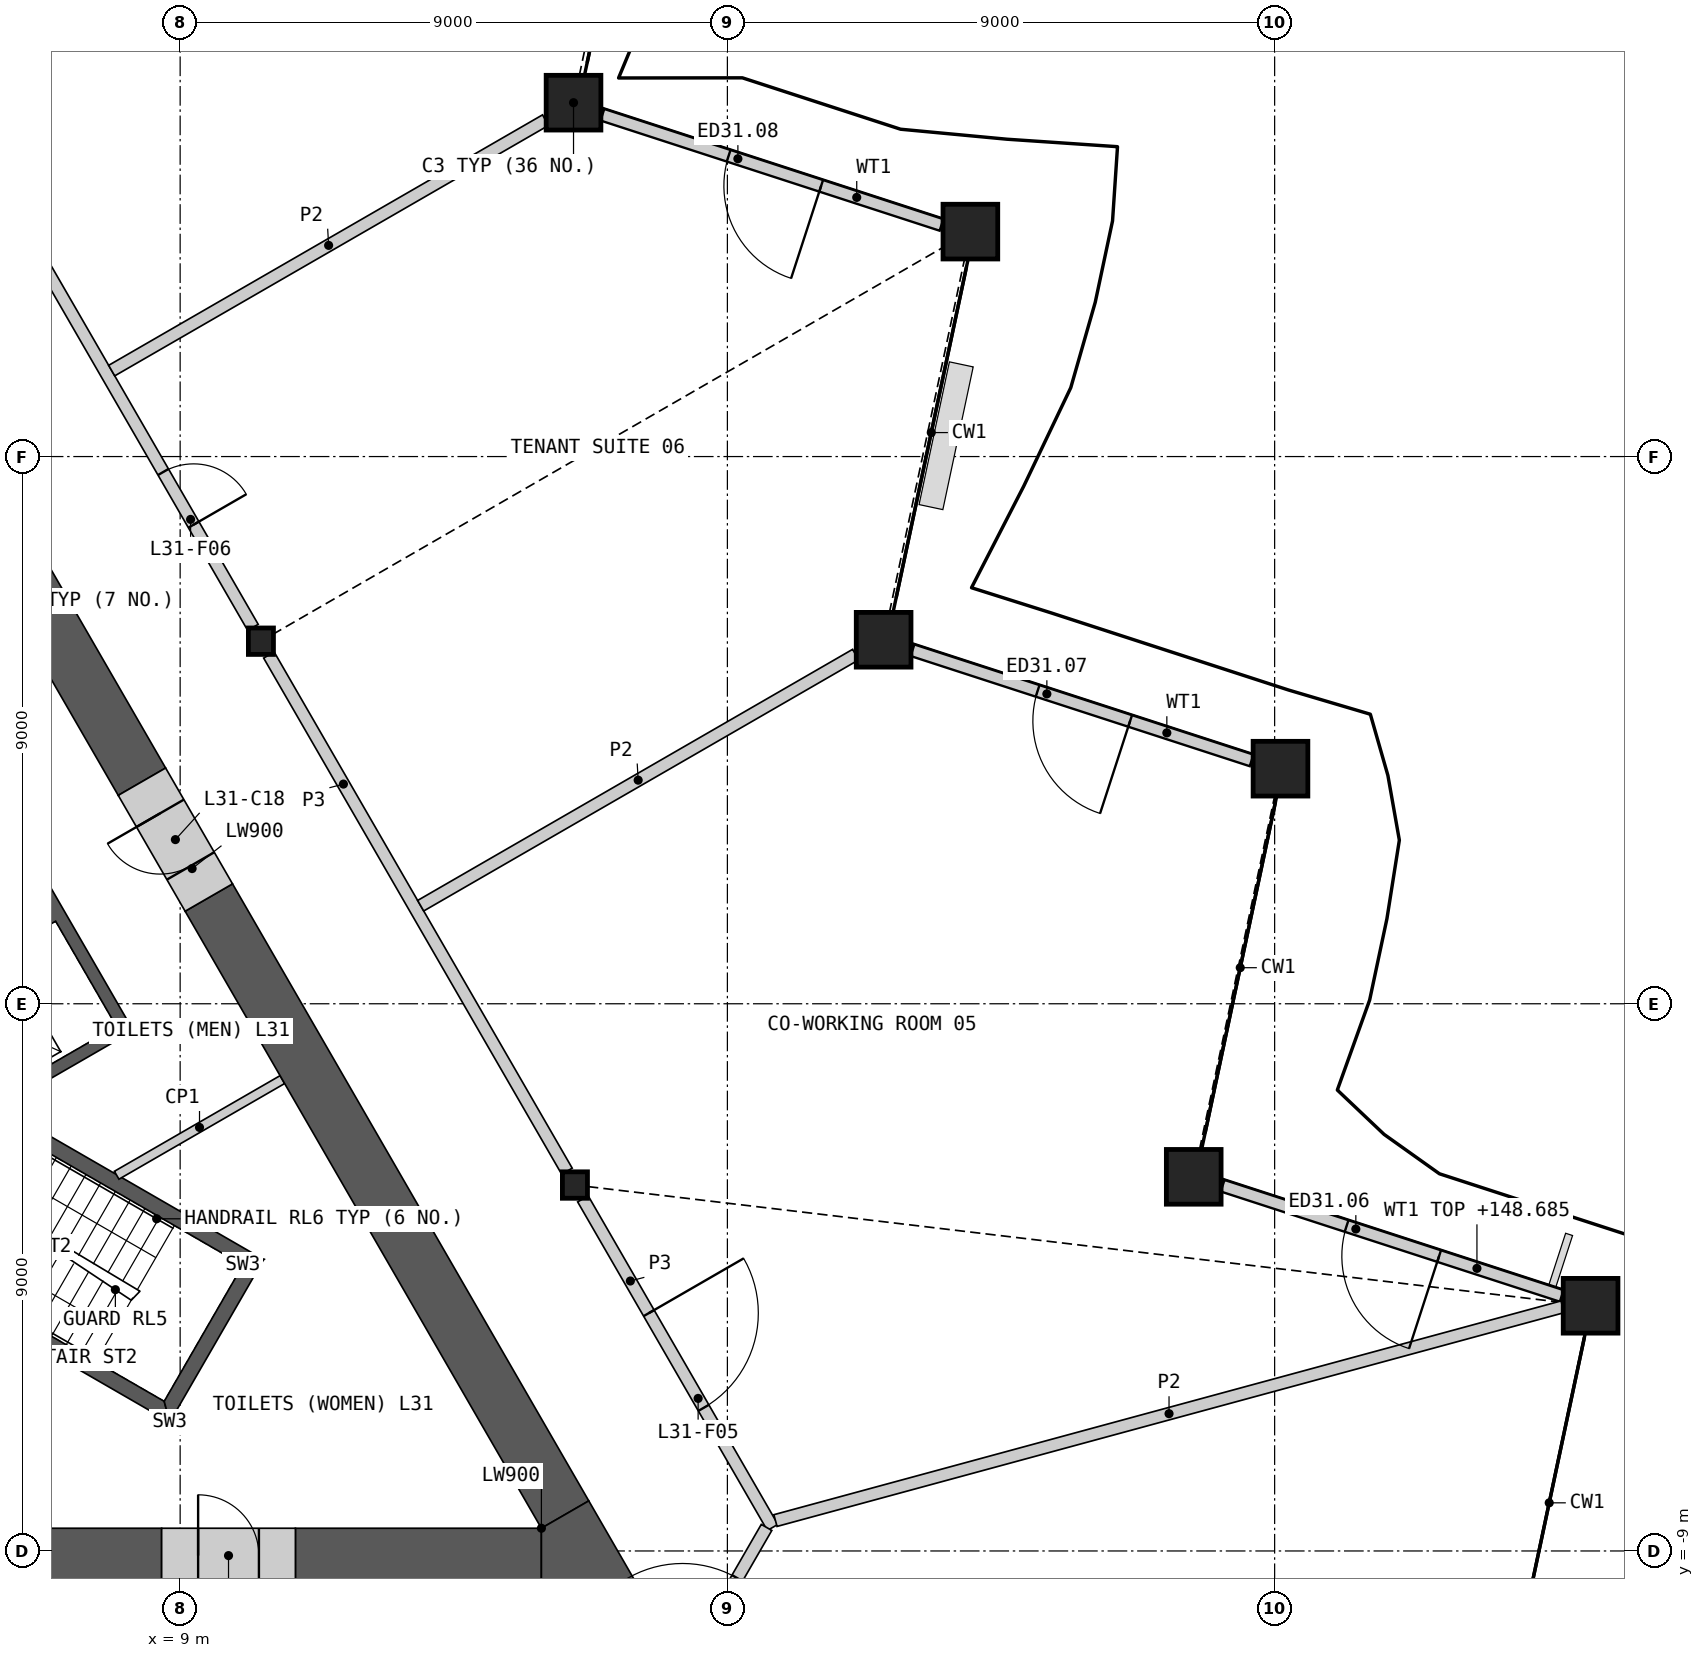
"""IFC4 building model, lengths in metres.
Left out: names, types, materials, properties, quantities, classifications, styles, units other than length and angle.
Written with IfcOpenShell. Run it as: python <this file> out.ifc"""

import sys

from ifc_helpers import new_model, si_unit, direction, frame, frame_2d, origin, origin_2d, place, context, subcontext, project, spatial, polyline, rectangle, hollow_rectangle, i_section, outline, extrude, element, fill, save


model = new_model("IFC4")
c1 = context("Model", 3, precision=1e-05, world=origin(), true_north=direction((0.0, 1.0)))
c2 = subcontext(c1, "Body", "Model", "MODEL_VIEW")
j1 = project(units=[si_unit("LENGTHUNIT", "METRE"), si_unit("PLANEANGLEUNIT", "RADIAN")], contexts=[c1])
p1 = place(None, origin())
s1 = spatial("IfcSite", under=j1, at=p1, CompositionType="ELEMENT")
p2 = place(p1, origin())
s2 = spatial("IfcBuilding", under=s1, at=p2, CompositionType="ELEMENT")
p3 = place(p2, frame((0.0, 0.0, 145.8)))
s3 = spatial("IfcBuildingStorey", under=s2, at=p3, CompositionType="ELEMENT", Elevation=145.8)
for number, where, z_axis, x_axis in (
    (1, (32.196, -4.967, 0.0), (0.0, 0.0, 1.0), (1.0, 0.0, 0.0)),
    (2, (25.669, -2.846, 0.0), (0.0, 0.0, 1.0), (1.0, 0.0, 0.0)),
    (3, (27.096, 3.866, 0.0), (0.0, 0.0, 1.0), (1.0, 0.0, 0.0)),
    (4, (20.57, 5.987, 0.0), (0.0, 0.0, 1.0), (1.0, 0.0, 0.0)),
    (5, (21.996, 12.699, 0.0), (0.0, 0.0, 1.0), (1.0, 0.0, 0.0)),
    (6, (15.469, 14.82, 0.0), (0.0, 0.0, 1.0), (1.0, 0.0, 0.0)),
):
    element("IfcColumn", number, at=place(p3, frame(where, z_axis=z_axis, x_axis=x_axis)), inside=s3, PredefinedType="COLUMN", context=c2, shape_type="SweptSolid", body=[
        extrude(hollow_rectangle(XDim=0.9, YDim=0.9, WallThickness=0.06, at=origin_2d()), origin(), (0.0, 0.0, 1.0), 4.2),
    ])
for number, where, z_axis, x_axis in (
    (7, (15.493, -2.982, 0.0), (0.0, 0.0, 1.0), (1.0, 0.0, 0.0)),
    (8, (10.328, 5.963, 0.0), (0.0, 0.0, 1.0), (1.0, 0.0, 0.0)),
):
    element("IfcColumn", number, at=place(p3, frame(where, z_axis=z_axis, x_axis=x_axis)), inside=s3, PredefinedType="COLUMN", context=c2, shape_type="SweptSolid", body=[
        extrude(i_section(OverallWidth=0.412, OverallDepth=0.435, WebThickness=0.036, FlangeThickness=0.057, at=origin_2d()), origin(), (0.0, 0.0, 1.0), 4.2),
    ])
p4 = place(p3, frame((31.721, -4.805, 0.0), z_axis=(0.0, 0.0, 1.0), x_axis=(-0.951053952554, 0.309024884649, 0.0)))
e9 = element("IfcWall", 9, at=p4, inside=s3, PredefinedType="SOLIDWALL", context=c2, shape_type="SweptSolid", body=[
    extrude(rectangle(XDim=5.865, YDim=0.2, at=frame_2d((2.932, 0.0))), origin(), (0.0, 0.0, 1.0), 2.885),
])
p5 = place(p4, frame((2.12, 0.0, 0.0)))
e10 = element("IfcOpeningElement", 10, at=p5, cuts=e9, PredefinedType="OPENING", context=c2, shape_type="SweptSolid", body=[
    extrude(rectangle(XDim=1.6, YDim=2.4, at=frame_2d((0.8, 1.2))), frame((0.0, 0.11, 0.0), z_axis=(0.0, -1.0, 0.0), x_axis=(1.0, 0.0, 0.0)), (0.0, 0.0, 1.0), 0.22),
])
p6 = place(p3, frame((26.622, 4.002, 0.0), z_axis=(0.0, 0.0, 1.0), x_axis=(-0.951053952554, 0.309024884649, 0.0)))
e11 = element("IfcWall", 11, at=p6, inside=s3, PredefinedType="SOLIDWALL", context=c2, shape_type="SweptSolid", body=[
    extrude(rectangle(XDim=5.865, YDim=0.2, at=frame_2d((2.932, 0.0))), origin(), (0.0, 0.0, 1.0), 3.189),
])
p7 = place(p6, frame((2.101, 0.0, 0.0)))
e12 = element("IfcOpeningElement", 12, at=p7, cuts=e11, PredefinedType="OPENING", context=c2, shape_type="SweptSolid", body=[
    extrude(rectangle(XDim=1.6, YDim=2.4, at=frame_2d((0.8, 1.2))), frame((0.0, 0.11, 0.0), z_axis=(0.0, -1.0, 0.0), x_axis=(1.0, 0.0, 0.0)), (0.0, 0.0, 1.0), 0.22),
])
p8 = place(p3, frame((21.521, 12.81, 0.0), z_axis=(0.0, 0.0, 1.0), x_axis=(-0.951049976734, 0.309037120351, 0.0)))
e13 = element("IfcWall", 13, at=p8, inside=s3, PredefinedType="SOLIDWALL", context=c2, shape_type="SweptSolid", body=[
    extrude(rectangle(XDim=5.864, YDim=0.2, at=frame_2d((2.932, 0.0))), origin(), (0.0, 0.0, 1.0), 3.189),
])
p9 = place(p8, frame((2.081, 0.0, 0.0)))
e14 = element("IfcOpeningElement", 14, at=p9, cuts=e13, PredefinedType="OPENING", context=c2, shape_type="SweptSolid", body=[
    extrude(rectangle(XDim=1.6, YDim=2.4, at=frame_2d((0.8, 1.2))), frame((0.0, 0.11, 0.0), z_axis=(0.0, -1.0, 0.0), x_axis=(1.0, 0.0, 0.0)), (0.0, 0.0, 1.0), 0.22),
])
p10 = place(p3, origin())
e15 = element("IfcWall", 15, at=p10, inside=s3, PredefinedType="SHEAR", context=c2, shape_type="SweptSolid", body=[
    extrude(outline(polyline([(2.66, 4.192), (4.831, 5.445), (8.231, -0.444), (6.061, -1.697), (5.96, -1.524), (7.952, -0.374), (6.952, 1.358), (4.96, 0.208), (4.861, 0.381), (6.852, 1.531), (5.852, 3.263), (3.861, 2.113), (3.76, 2.287), (5.752, 3.437), (4.752, 5.169), (2.76, 4.019), (2.66, 4.192)])), origin(), (0.0, 0.0, 1.0), 3.8),
])
p11 = place(p3, origin())
e16 = element("IfcWall", 16, at=p11, inside=s3, PredefinedType="SHEAR", context=c2, shape_type="SweptSolid", body=[
    extrude(outline(polyline([(3.763, -3.956), (8.83, -6.881), (8.738, -6.539), (3.888, -3.739), (3.763, -3.956)])), origin(), (0.0, 0.0, 1.0), 3.8),
])
p12 = place(p3, origin())
e17 = element("IfcWall", 17, at=p12, inside=s3, PredefinedType="SHEAR", context=c2, shape_type="SweptSolid", body=[
    extrude(outline(polyline([(8.83, -6.881), (10.374, -4.206), (10.032, -4.298), (8.738, -6.539), (8.83, -6.881)])), origin(), (0.0, 0.0, 1.0), 3.8),
])
p13 = place(p3, origin())
e18 = element("IfcWall", 18, at=p13, inside=s3, PredefinedType="SHEAR", context=c2, shape_type="SweptSolid", body=[
    extrude(outline(polyline([(10.032, -4.298), (10.374, -4.206), (5.307, -1.281), (5.182, -1.498), (10.032, -4.298)])), origin(), (0.0, 0.0, 1.0), 3.8),
])
p14 = place(p3, frame((10.681, -1.247, 0.0), z_axis=(0.0, 0.0, 1.0), x_axis=(-0.866018897435, -0.500011269158, 0.0)))
e19 = element("IfcWall", 19, at=p14, inside=s3, PredefinedType="PARTITIONING", context=c2, shape_type="SweptSolid", body=[
    extrude(rectangle(XDim=3.146, YDim=0.15, at=frame_2d((1.573, 0.0))), origin(), (0.0, 0.0, 1.0), 3.8),
])
p15 = place(p3, frame((1.1, -9.076, 0.0), z_axis=(0.0, 0.0, 1.0), x_axis=(1.0, 0.0, 0.0)))
e20 = element("IfcWall", 20, at=p15, inside=s3, PredefinedType="SHEAR", context=c2, shape_type="SweptSolid", body=[
    extrude(rectangle(XDim=7.595, YDim=0.9, at=frame_2d((3.798, 0.0))), origin(), (0.0, 0.0, 1.0), 3.8),
])
p16 = place(p3, frame((10.896, -9.076, 0.0), z_axis=(0.0, 0.0, 1.0), x_axis=(1.0, 0.0, 0.0)))
e21 = element("IfcWall", 21, at=p16, inside=s3, PredefinedType="SHEAR", context=c2, shape_type="SweptSolid", body=[
    extrude(rectangle(XDim=4.046, YDim=0.9, at=frame_2d((2.023, 0.0))), origin(), (0.0, 0.0, 1.0), 3.8),
])
p17 = place(p3, frame((8.372, 3.652, 0.0), z_axis=(0.0, 0.0, 1.0), x_axis=(-0.499997808738, 0.866026668906, 0.0)))
e22 = element("IfcWall", 22, at=p17, inside=s3, PredefinedType="SHEAR", context=c2, shape_type="SweptSolid", body=[
    extrude(rectangle(XDim=15.964, YDim=0.9, at=frame_2d((7.982, 0.0))), origin(), (0.0, 0.0, 1.0), 3.8),
])
p18 = place(p3, frame((15.331, -8.401, 0.0), z_axis=(0.0, 0.0, 1.0), x_axis=(-0.499995375004, 0.86602807401, 0.0)))
e23 = element("IfcWall", 23, at=p18, inside=s3, PredefinedType="SHEAR", context=c2, shape_type="SweptSolid", body=[
    extrude(rectangle(XDim=11.718, YDim=0.9, at=frame_2d((5.859, 0.0))), origin(), (0.0, 0.0, 1.0), 3.8),
])
p19 = place(p3, origin())
e24 = element("IfcWall", 24, at=p19, inside=s3, PredefinedType="SHEAR", context=c2, shape_type="SweptSolid", body=[
    extrude(outline(polyline([(14.941, -8.626), (15.721, -8.176), (16.5, -9.526), (14.941, -9.526), (14.941, -8.626)])), origin(), (0.0, 0.0, 1.0), 3.8),
])
p20 = place(p3, frame((8.696, -9.076, 0.0), z_axis=(0.0, 0.0, 1.0), x_axis=(1.0, 0.0, 0.0)))
e25 = element("IfcWall", 25, at=p20, inside=s3, PredefinedType="SHEAR", context=c2, shape_type="SweptSolid", body=[
    extrude(rectangle(XDim=2.2, YDim=0.9, at=frame_2d((1.1, 0.0))), origin(), (0.0, 0.0, 1.0), 3.8),
])
p21 = place(p20, frame((0.6, 0.0, 0.0)))
e26 = element("IfcOpeningElement", 26, at=p21, cuts=e25, PredefinedType="OPENING", context=c2, shape_type="SweptSolid", body=[
    extrude(rectangle(XDim=1.0, YDim=2.1, at=frame_2d((0.5, 1.05))), frame((0.0, 0.46, 0.0), z_axis=(0.0, -1.0, 0.0), x_axis=(1.0, 0.0, 0.0)), (0.0, 0.0, 1.0), 0.92),
])
p22 = place(p3, frame((9.472, 1.747, 0.0), z_axis=(0.0, 0.0, 1.0), x_axis=(-0.50002983664, 0.866008176907, 0.0)))
e27 = element("IfcWall", 27, at=p22, inside=s3, PredefinedType="SHEAR", context=c2, shape_type="SweptSolid", body=[
    extrude(rectangle(XDim=2.2, YDim=0.9, at=frame_2d((1.1, 0.0))), origin(), (0.0, 0.0, 1.0), 3.8),
])
p23 = place(p22, frame((0.6, 0.0, 0.0)))
e28 = element("IfcOpeningElement", 28, at=p23, cuts=e27, PredefinedType="OPENING", context=c2, shape_type="SweptSolid", body=[
    extrude(rectangle(XDim=1.0, YDim=2.1, at=frame_2d((0.5, 1.05))), frame((0.0, 0.46, 0.0), z_axis=(0.0, -1.0, 0.0), x_axis=(1.0, 0.0, 0.0)), (0.0, 0.0, 1.0), 0.92),
])
p24 = place(p3, frame((10.46, 5.736, 0.0), z_axis=(0.0, 0.0, 1.0), x_axis=(0.500004141693, -0.866023012564, 0.0)))
e29 = element("IfcWall", 29, at=p24, inside=s3, PredefinedType="PARTITIONING", context=c2, shape_type="SweptSolid", body=[
    extrude(rectangle(XDim=9.803, YDim=0.2, at=frame_2d((4.902, 0.0))), origin(), (0.0, 0.0, 1.0), 3.8),
])
p25 = place(p3, frame((5.295, 14.68, 0.0), z_axis=(0.0, 0.0, 1.0), x_axis=(0.500012035596, -0.866018454918, 0.0)))
e30 = element("IfcWall", 30, at=p25, inside=s3, PredefinedType="PARTITIONING", context=c2, shape_type="SweptSolid", body=[
    extrude(rectangle(XDim=9.803, YDim=0.2, at=frame_2d((4.902, 0.0))), origin(), (0.0, 0.0, 1.0), 3.8),
])
p26 = place(p25, frame((6.853, 0.0, 0.0)))
e31 = element("IfcOpeningElement", 31, at=p26, cuts=e30, PredefinedType="OPENING", context=c2, shape_type="SweptSolid", body=[
    extrude(rectangle(XDim=1.0, YDim=2.1, at=frame_2d((0.5, 1.05))), frame((0.0, 0.11, 0.0), z_axis=(0.0, -1.0, 0.0), x_axis=(1.0, 0.0, 0.0)), (0.0, 0.0, 1.0), 0.22),
])
p27 = place(p3, frame((15.624, -3.209, 0.0), z_axis=(0.0, 0.0, 1.0), x_axis=(0.499997920671, -0.866026604282, 0.0)))
e32 = element("IfcWall", 32, at=p27, inside=s3, PredefinedType="PARTITIONING", context=c2, shape_type="SweptSolid", body=[
    extrude(rectangle(XDim=6.24, YDim=0.2, at=frame_2d((3.12, 0.0))), origin(), (0.0, 0.0, 1.0), 3.8),
])
p28 = place(p27, frame((2.169, 0.0, 0.0)))
e33 = element("IfcOpeningElement", 33, at=p28, cuts=e32, PredefinedType="OPENING", context=c2, shape_type="SweptSolid", body=[
    extrude(rectangle(XDim=1.8, YDim=2.1, at=frame_2d((0.9, 1.05))), frame((0.0, 0.11, 0.0), z_axis=(0.0, -1.0, 0.0), x_axis=(1.0, 0.0, 0.0)), (0.0, 0.0, 1.0), 0.22),
])
p29 = place(p3, frame((16.781, -11.84, 0.0), z_axis=(0.0, 0.0, 1.0), x_axis=(0.499958791762, 0.866049194065, 0.0)))
e34 = element("IfcWall", 34, at=p29, inside=s3, PredefinedType="PARTITIONING", context=c2, shape_type="SweptSolid", body=[
    extrude(rectangle(XDim=3.726, YDim=0.2, at=frame_2d((1.863, 0.0))), origin(), (0.0, 0.0, 1.0), 3.8),
])
p30 = place(p29, frame((0.963, 0.0, 0.0)))
e35 = element("IfcOpeningElement", 35, at=p30, cuts=e34, PredefinedType="OPENING", context=c2, shape_type="SweptSolid", body=[
    extrude(rectangle(XDim=1.8, YDim=2.1, at=frame_2d((0.9, 1.05))), frame((0.0, 0.11, 0.0), z_axis=(0.0, -1.0, 0.0), x_axis=(1.0, 0.0, 0.0)), (0.0, 0.0, 1.0), 0.22),
])
p31 = place(p3, frame((18.79, -8.5, 0.0), z_axis=(0.0, 0.0, 1.0), x_axis=(0.965038802525, 0.262107057556, 0.0)))
e36 = element("IfcWall", 36, at=p31, inside=s3, PredefinedType="PARTITIONING", context=c2, shape_type="SweptSolid", body=[
    extrude(rectangle(XDim=13.415, YDim=0.2, at=frame_2d((6.708, 0.0))), origin(), (0.0, 0.0, 1.0), 2.885),
])
p32 = place(p3, frame((12.956, 1.613, 0.0), z_axis=(0.0, 0.0, 1.0), x_axis=(0.866032027724, 0.499988526824, 0.0)))
e37 = element("IfcWall", 37, at=p32, inside=s3, PredefinedType="PARTITIONING", context=c2, shape_type="SweptSolid", body=[
    extrude(rectangle(XDim=8.26, YDim=0.2, at=frame_2d((4.13, 0.0))), origin(), (0.0, 0.0, 1.0), 2.885),
])
p33 = place(p3, frame((7.875, 10.414, 0.0), z_axis=(0.0, 0.0, 1.0), x_axis=(0.866026194422, 0.499998630573, 0.0)))
e38 = element("IfcWall", 38, at=p33, inside=s3, PredefinedType="PARTITIONING", context=c2, shape_type="SweptSolid", body=[
    extrude(rectangle(XDim=8.239, YDim=0.2, at=frame_2d((4.119, 0.0))), origin(), (0.0, 0.0, 1.0), 2.885),
])
p34 = place(p5, origin())
e39 = element("IfcDoor", 39, at=p34, inside=s3, OperationType="DOUBLE_DOOR_SINGLE_SWING", PredefinedType="DOOR", context=c2, shape_type="SweptSolid", body=[
    extrude(rectangle(XDim=1.6, YDim=2.4, at=frame_2d((0.8, 1.2))), frame((0.0, 0.025, 0.0), z_axis=(0.0, -1.0, 0.0), x_axis=(1.0, 0.0, 0.0)), (0.0, 0.0, 1.0), 0.05),
])
fill(e10, e39)
p35 = place(p7, origin())
e40 = element("IfcDoor", 40, at=p35, inside=s3, OperationType="DOUBLE_DOOR_SINGLE_SWING", PredefinedType="DOOR", context=c2, shape_type="SweptSolid", body=[
    extrude(rectangle(XDim=1.6, YDim=2.4, at=frame_2d((0.8, 1.2))), frame((0.0, 0.025, 0.0), z_axis=(0.0, -1.0, 0.0), x_axis=(1.0, 0.0, 0.0)), (0.0, 0.0, 1.0), 0.05),
])
fill(e12, e40)
p36 = place(p9, origin())
e41 = element("IfcDoor", 41, at=p36, inside=s3, OperationType="DOUBLE_DOOR_SINGLE_SWING", PredefinedType="DOOR", context=c2, shape_type="SweptSolid", body=[
    extrude(rectangle(XDim=1.6, YDim=2.4, at=frame_2d((0.8, 1.2))), frame((0.0, 0.025, 0.0), z_axis=(0.0, -1.0, 0.0), x_axis=(1.0, 0.0, 0.0)), (0.0, 0.0, 1.0), 0.05),
])
fill(e14, e41)
p37 = place(p21, origin())
e42 = element("IfcDoor", 42, at=p37, inside=s3, OperationType="SINGLE_SWING_LEFT", PredefinedType="DOOR", context=c2, shape_type="SweptSolid", body=[
    extrude(rectangle(XDim=1.0, YDim=2.1, at=frame_2d((0.5, 1.05))), frame((0.0, 0.205, 0.0), z_axis=(0.0, -1.0, 0.0), x_axis=(1.0, 0.0, 0.0)), (0.0, 0.0, 1.0), 0.05),
])
fill(e26, e42)
p38 = place(p23, origin())
e43 = element("IfcDoor", 43, at=p38, inside=s3, OperationType="SINGLE_SWING_RIGHT", PredefinedType="DOOR", context=c2, shape_type="SweptSolid", body=[
    extrude(rectangle(XDim=1.0, YDim=2.1, at=frame_2d((0.5, 1.05))), frame((0.0, 0.205, 0.0), z_axis=(0.0, -1.0, 0.0), x_axis=(1.0, 0.0, 0.0)), (0.0, 0.0, 1.0), 0.05),
])
fill(e28, e43)
p39 = place(p30, origin())
e44 = element("IfcDoor", 44, at=p39, inside=s3, OperationType="DOUBLE_DOOR_SINGLE_SWING", PredefinedType="DOOR", context=c2, shape_type="SweptSolid", body=[
    extrude(rectangle(XDim=1.8, YDim=2.1, at=frame_2d((0.9, 1.05))), frame((0.0, 0.025, 0.0), z_axis=(0.0, -1.0, 0.0), x_axis=(1.0, 0.0, 0.0)), (0.0, 0.0, 1.0), 0.05),
])
fill(e35, e44)
p40 = place(p28, origin())
e45 = element("IfcDoor", 45, at=p40, inside=s3, OperationType="DOUBLE_DOOR_SINGLE_SWING", PredefinedType="DOOR", context=c2, shape_type="SweptSolid", body=[
    extrude(rectangle(XDim=1.8, YDim=2.1, at=frame_2d((0.9, 1.05))), frame((0.0, 0.025, 0.0), z_axis=(0.0, -1.0, 0.0), x_axis=(1.0, 0.0, 0.0)), (0.0, 0.0, 1.0), 0.05),
])
fill(e33, e45)
p41 = place(p26, origin())
e46 = element("IfcDoor", 46, at=p41, inside=s3, OperationType="SINGLE_SWING_RIGHT", PredefinedType="DOOR", context=c2, shape_type="SweptSolid", body=[
    extrude(rectangle(XDim=1.0, YDim=2.1, at=frame_2d((0.5, 1.05))), frame((0.0, 0.025, 0.0), z_axis=(0.0, -1.0, 0.0), x_axis=(1.0, 0.0, 0.0)), (0.0, 0.0, 1.0), 0.05),
])
fill(e31, e46)
save(model, sys.argv[1])
